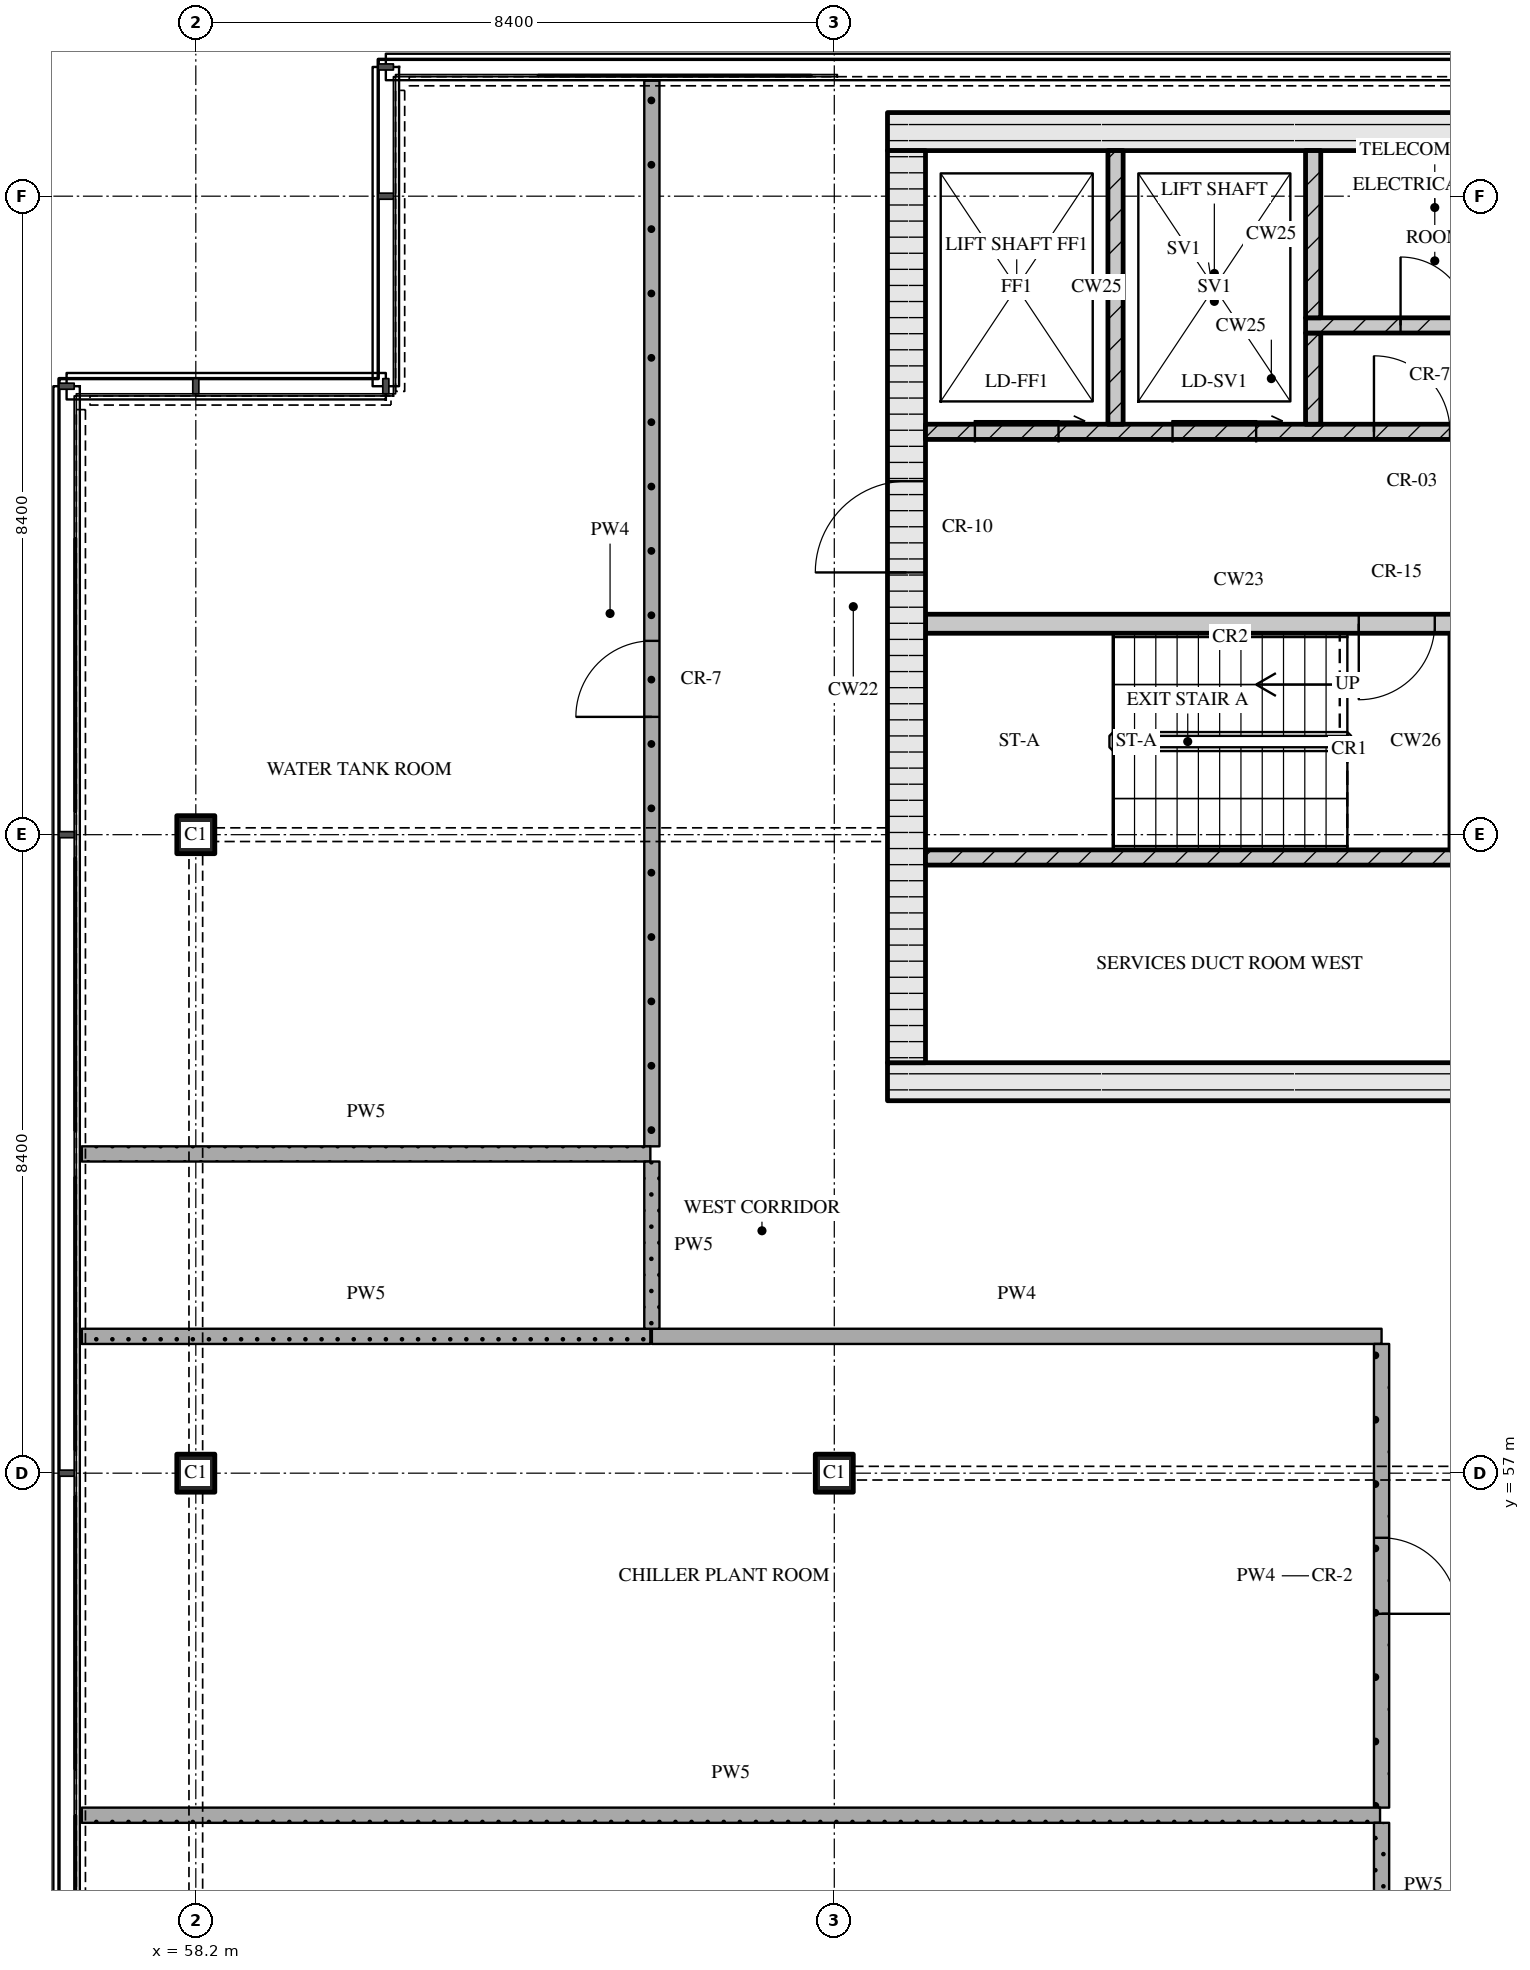
"""IFC4 building model, lengths in metres.
Left out: names, types, materials, properties, quantities, classifications, styles, units other than length and angle.
Written with IfcOpenShell. Run it as: python <this file> out.ifc"""

import sys

from ifc_helpers import new_model, si_unit, direction, frame, frame_2d, origin, origin_2d, place, context, subcontext, project, spatial, rectangle, extrude, element, fill, save


model = new_model("IFC4")
c1 = context("Model", 3, precision=1e-05, world=origin(), true_north=direction((0.0, 1.0)))
c2 = subcontext(c1, "Body", "Model", "MODEL_VIEW")
j1 = project(units=[si_unit("LENGTHUNIT", "METRE"), si_unit("PLANEANGLEUNIT", "RADIAN")], contexts=[c1])
p1 = place(None, origin())
s1 = spatial("IfcSite", under=j1, at=p1, CompositionType="ELEMENT")
p2 = place(p1, origin())
s2 = spatial("IfcBuilding", under=s1, at=p2, CompositionType="ELEMENT")
p3 = place(p2, frame((0.0, 0.0, 310.35)))
s3 = spatial("IfcBuildingStorey", under=s2, at=p3, CompositionType="ELEMENT", Elevation=310.35)
for number, where, z_axis, x_axis in (
    (1, (58.2, 57.0, 0.0), (0.0, 0.0, 1.0), (1.0, 0.0, 0.0)),
    (2, (58.2, 65.4, 0.0), (0.0, 0.0, 1.0), (1.0, 0.0, 0.0)),
    (3, (66.6, 57.0, 0.0), (0.0, 0.0, 1.0), (1.0, 0.0, 0.0)),
):
    element("IfcColumn", number, at=place(p3, frame(where, z_axis=z_axis, x_axis=x_axis)), inside=s3, PredefinedType="COLUMN", context=c2, shape_type="SweptSolid", body=[
        extrude(rectangle(XDim=0.5, YDim=0.5, at=origin_2d()), origin(), (0.0, 0.0, 1.0), 4.5),
    ])
p4 = place(p3, frame((67.3, 62.15, 0.0), z_axis=(0.0, 0.0, 1.0), x_axis=(1.0, 0.0, 0.0)))
e4 = element("IfcWall", 4, at=p4, inside=s3, PredefinedType="SOLIDWALL", context=c2, shape_type="SweptSolid", body=[
    extrude(rectangle(XDim=40.6, YDim=0.5, at=frame_2d((20.3, 0.0))), origin(), (0.0, 0.0, 1.0), 4.2),
])
p5 = place(p4, frame((20.65, 0.0, 0.0)))
e5 = element("IfcOpeningElement", 5, at=p5, cuts=e4, PredefinedType="OPENING", context=c2, shape_type="SweptSolid", body=[
    extrude(rectangle(XDim=1.8, YDim=2.1, at=frame_2d((0.9, 1.05))), frame((0.0, 0.26, 0.0), z_axis=(0.0, -1.0, 0.0), x_axis=(1.0, 0.0, 0.0)), (0.0, 0.0, 1.0), 0.52),
])
p6 = place(p3, frame((67.3, 74.65, 0.0), z_axis=(0.0, 0.0, 1.0), x_axis=(1.0, 0.0, 0.0)))
e6 = element("IfcWall", 6, at=p6, inside=s3, PredefinedType="SOLIDWALL", context=c2, shape_type="SweptSolid", body=[
    extrude(rectangle(XDim=40.6, YDim=0.5, at=frame_2d((20.3, 0.0))), origin(), (0.0, 0.0, 1.0), 4.2),
])
p7 = place(p3, frame((67.55, 62.4, 0.0), z_axis=(0.0, 0.0, 1.0), x_axis=(0.0, 1.0, 0.0)))
e7 = element("IfcWall", 7, at=p7, inside=s3, PredefinedType="SOLIDWALL", context=c2, shape_type="SweptSolid", body=[
    extrude(rectangle(XDim=12.0, YDim=0.5, at=frame_2d((6.0, 0.0))), origin(), (0.0, 0.0, 1.0), 4.2),
])
p8 = place(p7, frame((6.45, 0.0, 0.0)))
e8 = element("IfcOpeningElement", 8, at=p8, cuts=e7, PredefinedType="OPENING", context=c2, shape_type="SweptSolid", body=[
    extrude(rectangle(XDim=1.2, YDim=2.1, at=frame_2d((0.6, 1.05))), frame((0.0, 0.26, 0.0), z_axis=(0.0, -1.0, 0.0), x_axis=(1.0, 0.0, 0.0)), (0.0, 0.0, 1.0), 0.52),
])
p9 = place(p3, frame((67.8, 65.1, 0.0), z_axis=(0.0, 0.0, 1.0), x_axis=(1.0, 0.0, 0.0)))
e9 = element("IfcWall", 9, at=p9, inside=s3, PredefinedType="SOLIDWALL", context=c2, shape_type="SweptSolid", body=[
    extrude(rectangle(XDim=18.5, YDim=0.2, at=frame_2d((9.25, 0.0))), origin(), (0.0, 0.0, 1.0), 4.2),
])
p10 = place(p9, frame((7.27, 0.0, 0.0)))
e10 = element("IfcOpeningElement", 10, at=p10, cuts=e9, PredefinedType="OPENING", context=c2, shape_type="SweptSolid", body=[
    extrude(rectangle(XDim=0.9, YDim=2.1, at=frame_2d((0.45, 1.05))), frame((0.0, 0.11, 0.0), z_axis=(0.0, -1.0, 0.0), x_axis=(1.0, 0.0, 0.0)), (0.0, 0.0, 1.0), 0.22),
])
p11 = place(p9, frame((8.95, 0.0, 0.0)))
e11 = element("IfcOpeningElement", 11, at=p11, cuts=e9, PredefinedType="OPENING", context=c2, shape_type="SweptSolid", body=[
    extrude(rectangle(XDim=0.9, YDim=2.1, at=frame_2d((0.45, 1.05))), frame((0.0, 0.11, 0.0), z_axis=(0.0, -1.0, 0.0), x_axis=(1.0, 0.0, 0.0)), (0.0, 0.0, 1.0), 0.22),
])
p12 = place(p9, frame((11.42, 0.0, 0.0)))
e12 = element("IfcOpeningElement", 12, at=p12, cuts=e9, PredefinedType="OPENING", context=c2, shape_type="SweptSolid", body=[
    extrude(rectangle(XDim=0.9, YDim=2.1, at=frame_2d((0.45, 1.05))), frame((0.0, 0.11, 0.0), z_axis=(0.0, -1.0, 0.0), x_axis=(1.0, 0.0, 0.0)), (0.0, 0.0, 1.0), 0.22),
])
p13 = place(p9, frame((13.92, 0.0, 0.0)))
e13 = element("IfcOpeningElement", 13, at=p13, cuts=e9, PredefinedType="OPENING", context=c2, shape_type="SweptSolid", body=[
    extrude(rectangle(XDim=0.9, YDim=2.1, at=frame_2d((0.45, 1.05))), frame((0.0, 0.11, 0.0), z_axis=(0.0, -1.0, 0.0), x_axis=(1.0, 0.0, 0.0)), (0.0, 0.0, 1.0), 0.22),
])
p14 = place(p9, frame((16.7, 0.0, 0.0)))
e14 = element("IfcOpeningElement", 14, at=p14, cuts=e9, PredefinedType="OPENING", context=c2, shape_type="SweptSolid", body=[
    extrude(rectangle(XDim=0.9, YDim=2.1, at=frame_2d((0.45, 1.05))), frame((0.0, 0.11, 0.0), z_axis=(0.0, -1.0, 0.0), x_axis=(1.0, 0.0, 0.0)), (0.0, 0.0, 1.0), 0.22),
])
p15 = place(p3, frame((67.8, 68.175, 0.0), z_axis=(0.0, 0.0, 1.0), x_axis=(1.0, 0.0, 0.0)))
e15 = element("IfcWall", 15, at=p15, inside=s3, PredefinedType="SOLIDWALL", context=c2, shape_type="SweptSolid", body=[
    extrude(rectangle(XDim=8.25, YDim=0.25, at=frame_2d((4.125, 0.0))), origin(), (0.0, 0.0, 1.0), 4.2),
])
p16 = place(p15, frame((5.7, 0.0, 0.0)))
e16 = element("IfcOpeningElement", 16, at=p16, cuts=e15, PredefinedType="OPENING", context=c2, shape_type="SweptSolid", body=[
    extrude(rectangle(XDim=1.0, YDim=2.1, at=frame_2d((0.5, 1.05))), frame((0.0, 0.135, 0.0), z_axis=(0.0, -1.0, 0.0), x_axis=(1.0, 0.0, 0.0)), (0.0, 0.0, 1.0), 0.27),
])
p17 = place(p15, frame((7.2, 0.0, 0.0)))
e17 = element("IfcOpeningElement", 17, at=p17, cuts=e15, PredefinedType="OPENING", context=c2, shape_type="SweptSolid", body=[
    extrude(rectangle(XDim=0.8, YDim=2.1, at=frame_2d((0.4, 1.05))), frame((0.0, 0.135, 0.0), z_axis=(0.0, -1.0, 0.0), x_axis=(1.0, 0.0, 0.0)), (0.0, 0.0, 1.0), 0.27),
])
p18 = place(p3, frame((67.8, 70.7, 0.0), z_axis=(0.0, 0.0, 1.0), x_axis=(1.0, 0.0, 0.0)))
e18 = element("IfcWall", 18, at=p18, inside=s3, PredefinedType="SOLIDWALL", context=c2, shape_type="SweptSolid", body=[
    extrude(rectangle(XDim=39.6, YDim=0.2, at=frame_2d((19.8, 0.0))), origin(), (0.0, 0.0, 1.0), 4.2),
])
p19 = place(p18, frame((0.65, 0.0, 0.0)))
e19 = element("IfcOpeningElement", 19, at=p19, cuts=e18, PredefinedType="OPENING", context=c2, shape_type="SweptSolid", body=[
    extrude(rectangle(XDim=1.1, YDim=2.1, at=frame_2d((0.55, 1.05))), frame((0.0, 0.11, 0.0), z_axis=(0.0, -1.0, 0.0), x_axis=(1.0, 0.0, 0.0)), (0.0, 0.0, 1.0), 0.22),
])
p20 = place(p18, frame((3.25, 0.0, 0.0)))
e20 = element("IfcOpeningElement", 20, at=p20, cuts=e18, PredefinedType="OPENING", context=c2, shape_type="SweptSolid", body=[
    extrude(rectangle(XDim=1.1, YDim=2.1, at=frame_2d((0.55, 1.05))), frame((0.0, 0.11, 0.0), z_axis=(0.0, -1.0, 0.0), x_axis=(1.0, 0.0, 0.0)), (0.0, 0.0, 1.0), 0.22),
])
p21 = place(p18, frame((5.9, 0.0, 0.0)))
e21 = element("IfcOpeningElement", 21, at=p21, cuts=e18, PredefinedType="OPENING", context=c2, shape_type="SweptSolid", body=[
    extrude(rectangle(XDim=1.0, YDim=2.1, at=frame_2d((0.5, 1.05))), frame((0.0, 0.11, 0.0), z_axis=(0.0, -1.0, 0.0), x_axis=(1.0, 0.0, 0.0)), (0.0, 0.0, 1.0), 0.22),
])
p22 = place(p18, frame((21.7, 0.0, 0.0)))
e22 = element("IfcOpeningElement", 22, at=p22, cuts=e18, PredefinedType="OPENING", context=c2, shape_type="SweptSolid", body=[
    extrude(rectangle(XDim=1.0, YDim=2.1, at=frame_2d((0.5, 1.05))), frame((0.0, 0.11, 0.0), z_axis=(0.0, -1.0, 0.0), x_axis=(1.0, 0.0, 0.0)), (0.0, 0.0, 1.0), 0.22),
])
p23 = place(p18, frame((32.7, 0.0, 0.0)))
e23 = element("IfcOpeningElement", 23, at=p23, cuts=e18, PredefinedType="OPENING", context=c2, shape_type="SweptSolid", body=[
    extrude(rectangle(XDim=1.0, YDim=2.1, at=frame_2d((0.5, 1.05))), frame((0.0, 0.11, 0.0), z_axis=(0.0, -1.0, 0.0), x_axis=(1.0, 0.0, 0.0)), (0.0, 0.0, 1.0), 0.22),
])
p24 = place(p18, frame((35.25, 0.0, 0.0)))
e24 = element("IfcOpeningElement", 24, at=p24, cuts=e18, PredefinedType="OPENING", context=c2, shape_type="SweptSolid", body=[
    extrude(rectangle(XDim=1.1, YDim=2.1, at=frame_2d((0.55, 1.05))), frame((0.0, 0.11, 0.0), z_axis=(0.0, -1.0, 0.0), x_axis=(1.0, 0.0, 0.0)), (0.0, 0.0, 1.0), 0.22),
])
p25 = place(p18, frame((37.85, 0.0, 0.0)))
e25 = element("IfcOpeningElement", 25, at=p25, cuts=e18, PredefinedType="OPENING", context=c2, shape_type="SweptSolid", body=[
    extrude(rectangle(XDim=1.1, YDim=2.1, at=frame_2d((0.55, 1.05))), frame((0.0, 0.11, 0.0), z_axis=(0.0, -1.0, 0.0), x_axis=(1.0, 0.0, 0.0)), (0.0, 0.0, 1.0), 0.22),
])
p26 = place(p3, frame((70.3, 70.8, 0.0), z_axis=(0.0, 0.0, 1.0), x_axis=(0.0, 1.0, 0.0)))
e26 = element("IfcWall", 26, at=p26, inside=s3, PredefinedType="SOLIDWALL", context=c2, shape_type="SweptSolid", body=[
    extrude(rectangle(XDim=3.6, YDim=0.2, at=frame_2d((1.8, 0.0))), origin(), (0.0, 0.0, 1.0), 4.2),
])
p27 = place(p3, frame((72.9, 70.8, 0.0), z_axis=(0.0, 0.0, 1.0), x_axis=(0.0, 1.0, 0.0)))
e27 = element("IfcWall", 27, at=p27, inside=s3, PredefinedType="SOLIDWALL", context=c2, shape_type="SweptSolid", body=[
    extrude(rectangle(XDim=1.2, YDim=0.2, at=frame_2d((0.6, 0.0))), origin(), (0.0, 0.0, 1.0), 4.2),
])
p28 = place(p3, frame((72.8, 72.1, 0.0), z_axis=(0.0, 0.0, 1.0), x_axis=(1.0, 0.0, 0.0)))
e28 = element("IfcWall", 28, at=p28, inside=s3, PredefinedType="SOLIDWALL", context=c2, shape_type="SweptSolid", body=[
    extrude(rectangle(XDim=11.0, YDim=0.2, at=frame_2d((5.5, 0.0))), origin(), (0.0, 0.0, 1.0), 4.2),
])
p29 = place(p28, frame((1.25, 0.0, 0.0)))
e29 = element("IfcOpeningElement", 29, at=p29, cuts=e28, PredefinedType="OPENING", context=c2, shape_type="SweptSolid", body=[
    extrude(rectangle(XDim=0.9, YDim=2.1, at=frame_2d((0.45, 1.05))), frame((0.0, 0.11, 0.0), z_axis=(0.0, -1.0, 0.0), x_axis=(1.0, 0.0, 0.0)), (0.0, 0.0, 1.0), 0.22),
])
p30 = place(p28, frame((4.95, 0.0, 0.0)))
e30 = element("IfcOpeningElement", 30, at=p30, cuts=e28, PredefinedType="OPENING", context=c2, shape_type="SweptSolid", body=[
    extrude(rectangle(XDim=0.9, YDim=2.1, at=frame_2d((0.45, 1.05))), frame((0.0, 0.11, 0.0), z_axis=(0.0, -1.0, 0.0), x_axis=(1.0, 0.0, 0.0)), (0.0, 0.0, 1.0), 0.22),
])
p31 = place(p28, frame((8.685, 0.0, 0.0)))
e31 = element("IfcOpeningElement", 31, at=p31, cuts=e28, PredefinedType="OPENING", context=c2, shape_type="SweptSolid", body=[
    extrude(rectangle(XDim=0.9, YDim=2.1, at=frame_2d((0.45, 1.05))), frame((0.0, 0.11, 0.0), z_axis=(0.0, -1.0, 0.0), x_axis=(1.0, 0.0, 0.0)), (0.0, 0.0, 1.0), 0.22),
])
p32 = place(p3, frame((72.9, 72.2, 0.0), z_axis=(0.0, 0.0, 1.0), x_axis=(0.0, 1.0, 0.0)))
e32 = element("IfcWall", 32, at=p32, inside=s3, PredefinedType="SOLIDWALL", context=c2, shape_type="SweptSolid", body=[
    extrude(rectangle(XDim=2.2, YDim=0.2, at=frame_2d((1.1, 0.0))), origin(), (0.0, 0.0, 1.0), 4.2),
])
p33 = place(p3, frame((56.7, 52.5, 0.0), z_axis=(0.0, 0.0, 1.0), x_axis=(1.0, 0.0, 0.0)))
e33 = element("IfcWall", 33, at=p33, inside=s3, PredefinedType="PARTITIONING", context=c2, shape_type="SweptSolid", body=[
    extrude(rectangle(XDim=17.08, YDim=0.2, at=frame_2d((8.54, 0.0))), origin(), (0.0, 0.0, 1.0), 4.2),
])
p34 = place(p3, frame((56.7, 58.8, 0.0), z_axis=(0.0, 0.0, 1.0), x_axis=(1.0, 0.0, 0.0)))
e34 = element("IfcWall", 34, at=p34, inside=s3, PredefinedType="PARTITIONING", context=c2, shape_type="SweptSolid", body=[
    extrude(rectangle(XDim=7.48, YDim=0.2, at=frame_2d((3.74, 0.0))), origin(), (0.0, 0.0, 1.0), 4.2),
])
p35 = place(p3, frame((64.2, 58.8, 0.0), z_axis=(0.0, 0.0, 1.0), x_axis=(1.0, 0.0, 0.0)))
e35 = element("IfcWall", 35, at=p35, inside=s3, PredefinedType="PARTITIONING", context=c2, shape_type="SweptSolid", body=[
    extrude(rectangle(XDim=9.6, YDim=0.2, at=frame_2d((4.8, 0.0))), origin(), (0.0, 0.0, 1.0), 4.2),
])
p36 = place(p3, frame((56.7, 61.2, 0.0), z_axis=(0.0, 0.0, 1.0), x_axis=(1.0, 0.0, 0.0)))
e36 = element("IfcWall", 36, at=p36, inside=s3, PredefinedType="PARTITIONING", context=c2, shape_type="SweptSolid", body=[
    extrude(rectangle(XDim=7.48, YDim=0.2, at=frame_2d((3.74, 0.0))), origin(), (0.0, 0.0, 1.0), 4.2),
])
p37 = place(p3, frame((64.2, 61.1, 0.0), z_axis=(0.0, 0.0, 1.0), x_axis=(0.0, -1.0, 0.0)))
e37 = element("IfcWall", 37, at=p37, inside=s3, PredefinedType="PARTITIONING", context=c2, shape_type="SweptSolid", body=[
    extrude(rectangle(XDim=2.2, YDim=0.2, at=frame_2d((1.1, 0.0))), origin(), (0.0, 0.0, 1.0), 4.2),
])
p38 = place(p3, frame((64.2, 61.3, 0.0), z_axis=(0.0, 0.0, 1.0), x_axis=(0.0, 1.0, 0.0)))
e38 = element("IfcWall", 38, at=p38, inside=s3, PredefinedType="PARTITIONING", context=c2, shape_type="SweptSolid", body=[
    extrude(rectangle(XDim=14.02, YDim=0.2, at=frame_2d((7.01, 0.0))), origin(), (0.0, 0.0, 1.0), 4.2),
])
p39 = place(p38, frame((5.65, 0.0, 0.0)))
e39 = element("IfcOpeningElement", 39, at=p39, cuts=e38, PredefinedType="OPENING", context=c2, shape_type="SweptSolid", body=[
    extrude(rectangle(XDim=1.0, YDim=2.1, at=frame_2d((0.5, 1.05))), frame((0.0, 0.11, 0.0), z_axis=(0.0, -1.0, 0.0), x_axis=(1.0, 0.0, 0.0)), (0.0, 0.0, 1.0), 0.22),
])
p40 = place(p3, frame((73.8, 52.4, 0.0), z_axis=(0.0, 0.0, 1.0), x_axis=(0.0, -1.0, 0.0)))
e40 = element("IfcWall", 40, at=p40, inside=s3, PredefinedType="PARTITIONING", context=c2, shape_type="SweptSolid", body=[
    extrude(rectangle(XDim=1.65, YDim=0.2, at=frame_2d((0.825, 0.0))), origin(), (0.0, 0.0, 1.0), 4.2),
])
p41 = place(p3, frame((73.8, 52.6, 0.0), z_axis=(0.0, 0.0, 1.0), x_axis=(0.0, 1.0, 0.0)))
e41 = element("IfcWall", 41, at=p41, inside=s3, PredefinedType="PARTITIONING", context=c2, shape_type="SweptSolid", body=[
    extrude(rectangle(XDim=6.1, YDim=0.2, at=frame_2d((3.05, 0.0))), origin(), (0.0, 0.0, 1.0), 4.2),
])
p42 = place(p41, frame((2.55, 0.0, 0.0)))
e42 = element("IfcOpeningElement", 42, at=p42, cuts=e41, PredefinedType="OPENING", context=c2, shape_type="SweptSolid", body=[
    extrude(rectangle(XDim=1.0, YDim=2.1, at=frame_2d((0.5, 1.05))), frame((0.0, 0.11, 0.0), z_axis=(0.0, -1.0, 0.0), x_axis=(1.0, 0.0, 0.0)), (0.0, 0.0, 1.0), 0.22),
])
p43 = place(p16, origin())
e43 = element("IfcDoor", 43, at=p43, inside=s3, OperationType="SINGLE_SWING_RIGHT", PredefinedType="DOOR", context=c2, shape_type="SweptSolid", body=[
    extrude(rectangle(XDim=1.0, YDim=2.1, at=frame_2d((0.5, 1.05))), frame((0.0, 0.025, 0.0), z_axis=(0.0, -1.0, 0.0), x_axis=(1.0, 0.0, 0.0)), (0.0, 0.0, 1.0), 0.05),
])
fill(e16, e43)
p44 = place(p8, origin())
e44 = element("IfcDoor", 44, at=p44, inside=s3, OperationType="SINGLE_SWING_LEFT", PredefinedType="DOOR", context=c2, shape_type="SweptSolid", body=[
    extrude(rectangle(XDim=1.2, YDim=2.1, at=frame_2d((0.6, 1.05))), frame((0.0, 0.025, 0.0), z_axis=(0.0, -1.0, 0.0), x_axis=(1.0, 0.0, 0.0)), (0.0, 0.0, 1.0), 0.05),
])
fill(e8, e44)
p45 = place(p19, origin())
e45 = element("IfcDoor", 45, at=p45, inside=s3, OperationType="SLIDING_TO_RIGHT", PredefinedType="DOOR", context=c2, shape_type="SweptSolid", body=[
    extrude(rectangle(XDim=1.1, YDim=2.1, at=frame_2d((0.55, 1.05))), frame((0.0, 0.025, 0.0), z_axis=(0.0, -1.0, 0.0), x_axis=(1.0, 0.0, 0.0)), (0.0, 0.0, 1.0), 0.05),
])
fill(e19, e45)
p46 = place(p20, origin())
e46 = element("IfcDoor", 46, at=p46, inside=s3, OperationType="SLIDING_TO_RIGHT", PredefinedType="DOOR", context=c2, shape_type="SweptSolid", body=[
    extrude(rectangle(XDim=1.1, YDim=2.1, at=frame_2d((0.55, 1.05))), frame((0.0, 0.025, 0.0), z_axis=(0.0, -1.0, 0.0), x_axis=(1.0, 0.0, 0.0)), (0.0, 0.0, 1.0), 0.05),
])
fill(e20, e46)
p47 = place(p21, origin())
e47 = element("IfcDoor", 47, at=p47, inside=s3, OperationType="SINGLE_SWING_LEFT", PredefinedType="DOOR", context=c2, shape_type="SweptSolid", body=[
    extrude(rectangle(XDim=1.0, YDim=2.1, at=frame_2d((0.5, 1.05))), frame((0.0, 0.025, 0.0), z_axis=(0.0, -1.0, 0.0), x_axis=(1.0, 0.0, 0.0)), (0.0, 0.0, 1.0), 0.05),
])
fill(e21, e47)
p48 = place(p29, origin())
e48 = element("IfcDoor", 48, at=p48, inside=s3, OperationType="SINGLE_SWING_LEFT", PredefinedType="DOOR", context=c2, shape_type="SweptSolid", body=[
    extrude(rectangle(XDim=0.9, YDim=2.1, at=frame_2d((0.45, 1.05))), frame((0.0, 0.025, 0.0), z_axis=(0.0, -1.0, 0.0), x_axis=(1.0, 0.0, 0.0)), (0.0, 0.0, 1.0), 0.05),
])
fill(e29, e48)
p49 = place(p39, origin())
e49 = element("IfcDoor", 49, at=p49, inside=s3, OperationType="SINGLE_SWING_LEFT", PredefinedType="DOOR", context=c2, shape_type="SweptSolid", body=[
    extrude(rectangle(XDim=1.0, YDim=2.1, at=frame_2d((0.5, 1.05))), frame((0.0, 0.025, 0.0), z_axis=(0.0, -1.0, 0.0), x_axis=(1.0, 0.0, 0.0)), (0.0, 0.0, 1.0), 0.05),
])
fill(e39, e49)
p50 = place(p42, origin())
e50 = element("IfcDoor", 50, at=p50, inside=s3, OperationType="SINGLE_SWING_RIGHT", PredefinedType="DOOR", context=c2, shape_type="SweptSolid", body=[
    extrude(rectangle(XDim=1.0, YDim=2.1, at=frame_2d((0.5, 1.05))), frame((0.0, 0.025, 0.0), z_axis=(0.0, -1.0, 0.0), x_axis=(1.0, 0.0, 0.0)), (0.0, 0.0, 1.0), 0.05),
])
fill(e42, e50)
save(model, sys.argv[1])
